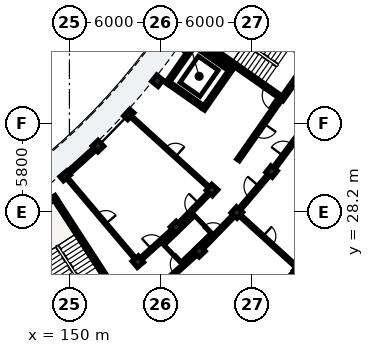
"""IFC4 building model, lengths in metres.
Left out: names, types, materials, properties, quantities, classifications, styles, units other than length and angle.
Written with IfcOpenShell. Run it as: python <this file> out.ifc"""

import sys

from ifc_helpers import new_model, si_unit, direction, frame, frame_2d, origin, origin_2d, place, context, subcontext, project, spatial, rectangle, extrude, element, fill, save


model = new_model("IFC4")
c1 = context("Model", 3, precision=1e-05, world=origin(), true_north=direction((0.0, 1.0)))
c2 = subcontext(c1, "Body", "Model", "MODEL_VIEW")
j1 = project(units=[si_unit("LENGTHUNIT", "METRE"), si_unit("PLANEANGLEUNIT", "RADIAN")], contexts=[c1])
p1 = place(None, origin())
s1 = spatial("IfcSite", under=j1, at=p1, CompositionType="ELEMENT")
p2 = place(p1, origin())
s2 = spatial("IfcBuilding", under=s1, at=p2, CompositionType="ELEMENT")
p3 = place(p2, frame((0.0, 0.0, 15.56)))
s3 = spatial("IfcBuildingStorey", under=s2, at=p3, CompositionType="ELEMENT", Elevation=15.56)
p4 = place(p3, frame((152.674, 23.484, 0.0), z_axis=(0.0, 0.0, 1.0), x_axis=(-0.544655453679, 0.838659905312, 0.0)))
e1 = element("IfcWall", 1, at=p4, inside=s3, PredefinedType="SHEAR", context=c2, shape_type="SweptSolid", body=[
    extrude(rectangle(XDim=6.6, YDim=0.25, at=frame_2d((3.3, 0.0))), origin(), (0.0, 0.0, 1.0), 3.11),
])
p5 = place(p3, frame((149.116, 29.192, 0.0), z_axis=(0.0, 0.0, 1.0), x_axis=(-0.838699580527, -0.544594356953, 0.0)))
e2 = element("IfcWall", 2, at=p5, inside=s3, PredefinedType="SHEAR", context=c2, shape_type="SweptSolid", body=[
    extrude(rectangle(XDim=3.42, YDim=0.25, at=frame_2d((1.71, 0.0))), origin(), (0.0, 0.0, 1.0), 3.11),
])
p6 = place(p3, frame((150.015, 21.757, 0.0), z_axis=(0.0, 0.0, 1.0), x_axis=(-0.544629435258, 0.838676802022, 0.0)))
e3 = element("IfcWall", 3, at=p6, inside=s3, PredefinedType="SHEAR", context=c2, shape_type="SweptSolid", body=[
    extrude(rectangle(XDim=6.6, YDim=0.25, at=frame_2d((3.3, 0.0))), origin(), (0.0, 0.0, 1.0), 3.11),
])
p7 = place(p6, frame((0.22, 0.0, 0.0)))
e4 = element("IfcOpeningElement", 4, at=p7, cuts=e3, PredefinedType="OPENING", context=c2, shape_type="SweptSolid", body=[
    extrude(rectangle(XDim=1.05, YDim=2.15, at=frame_2d((0.525, 1.075))), frame((0.0, 0.135, 0.0), z_axis=(0.0, -1.0, 0.0), x_axis=(1.0, 0.0, 0.0)), (0.0, 0.0, 1.0), 0.27),
])
p8 = place(p3, frame((165.733, 38.336, 0.0), z_axis=(0.0, 0.0, 1.0), x_axis=(-0.819153711596, 0.573574055182, 0.0)))
e5 = element("IfcWall", 5, at=p8, inside=s3, PredefinedType="SHEAR", context=c2, shape_type="SweptSolid", body=[
    extrude(rectangle(XDim=6.6, YDim=0.25, at=frame_2d((3.3, 0.0))), origin(), (0.0, 0.0, 1.0), 3.11),
])
p9 = place(p3, frame((165.907, 38.366, 0.0), z_axis=(0.0, 0.0, 1.0), x_axis=(-0.573582112484, -0.819148069789, 0.0)))
e6 = element("IfcWall", 6, at=p9, inside=s3, PredefinedType="SHEAR", context=c2, shape_type="SweptSolid", body=[
    extrude(rectangle(XDim=3.42, YDim=0.25, at=frame_2d((1.71, 0.0))), origin(), (0.0, 0.0, 1.0), 3.11),
])
p10 = place(p3, frame((163.914, 35.739, 0.0), z_axis=(0.0, 0.0, 1.0), x_axis=(-0.819153711596, 0.573574055182, 0.0)))
e7 = element("IfcWall", 7, at=p10, inside=s3, PredefinedType="SHEAR", context=c2, shape_type="SweptSolid", body=[
    extrude(rectangle(XDim=6.6, YDim=0.25, at=frame_2d((3.3, 0.0))), origin(), (0.0, 0.0, 1.0), 3.11),
])
p11 = place(p10, frame((0.22, 0.0, 0.0)))
e8 = element("IfcOpeningElement", 8, at=p11, cuts=e7, PredefinedType="OPENING", context=c2, shape_type="SweptSolid", body=[
    extrude(rectangle(XDim=1.05, YDim=2.15, at=frame_2d((0.525, 1.075))), frame((0.0, 0.135, 0.0), z_axis=(0.0, -1.0, 0.0), x_axis=(1.0, 0.0, 0.0)), (0.0, 0.0, 1.0), 0.27),
])
p12 = place(p3, frame((160.668, 37.615, 0.0), z_axis=(0.0, 0.0, 1.0), x_axis=(-0.573582966431, -0.819147471839, 0.0)))
e9 = element("IfcWall", 9, at=p12, inside=s3, PredefinedType="SHEAR", context=c2, shape_type="SweptSolid", body=[
    extrude(rectangle(XDim=3.26, YDim=0.23, at=frame_2d((1.63, 0.0))), origin(), (0.0, 0.0, 1.0), 3.11),
])
p13 = place(p12, frame((0.9, 0.0, 0.0)))
e10 = element("IfcOpeningElement", 10, at=p13, cuts=e9, PredefinedType="OPENING", context=c2, shape_type="SweptSolid", body=[
    extrude(rectangle(XDim=1.0, YDim=2.15, at=frame_2d((0.5, 1.075))), frame((0.0, 0.125, 0.0), z_axis=(0.0, -1.0, 0.0), x_axis=(1.0, 0.0, 0.0)), (0.0, 0.0, 1.0), 0.25),
])
p14 = place(p3, frame((158.268, 39.296, 0.0), z_axis=(0.0, 0.0, 1.0), x_axis=(-0.573582966431, -0.819147471839, 0.0)))
e11 = element("IfcWall", 11, at=p14, inside=s3, PredefinedType="SHEAR", context=c2, shape_type="SweptSolid", body=[
    extrude(rectangle(XDim=3.26, YDim=0.23, at=frame_2d((1.63, 0.0))), origin(), (0.0, 0.0, 1.0), 3.11),
])
p15 = place(p3, frame((160.508, 37.587, 0.0), z_axis=(0.0, 0.0, 1.0), x_axis=(-0.819189439894, 0.573523026186, 0.0)))
e12 = element("IfcWall", 12, at=p15, inside=s3, PredefinedType="SHEAR", context=c2, shape_type="SweptSolid", body=[
    extrude(rectangle(XDim=2.7, YDim=0.23, at=frame_2d((1.35, 0.0))), origin(), (0.0, 0.0, 1.0), 3.11),
])
p16 = place(p3, frame((158.77, 35.105, 0.0), z_axis=(0.0, 0.0, 1.0), x_axis=(-0.819117209968, 0.573626181702, 0.0)))
e13 = element("IfcWall", 13, at=p16, inside=s3, PredefinedType="SHEAR", context=c2, shape_type="SweptSolid", body=[
    extrude(rectangle(XDim=2.7, YDim=0.23, at=frame_2d((1.35, 0.0))), origin(), (0.0, 0.0, 1.0), 3.11),
])
p17 = place(p3, frame((149.72, 30.574, 0.0), z_axis=(0.0, 0.0, 1.0), x_axis=(0.646123979643, -0.763232469783, 0.0)))
e14 = element("IfcColumn", 14, at=p17, inside=s3, PredefinedType="PILASTER", context=c2, shape_type="SweptSolid", body=[
    extrude(rectangle(XDim=0.38, YDim=0.62, at=origin_2d()), origin(), (0.0, 0.0, 1.0), 3.11),
])
for number, where, z_axis, x_axis in (
    (15, (154.501, 24.927, 0.0), (0.0, 0.0, 1.0), (0.646, -0.763, 0.0)),
    (16, (151.878, 32.525, 0.0), (0.0, 0.0, 1.0), (0.695, -0.719, 0.0)),
    (17, (157.018, 27.202, 0.0), (0.0, 0.0, 1.0), (0.695, -0.719, 0.0)),
    (18, (158.546, 25.62, 0.0), (0.0, 0.0, 1.0), (0.695, -0.719, 0.0)),
):
    element("IfcColumn", number, at=place(p3, frame(where, z_axis=z_axis, x_axis=x_axis)), inside=s3, PredefinedType="COLUMN", context=c2, shape_type="SweptSolid", body=[
        extrude(rectangle(XDim=0.56, YDim=0.56, at=origin_2d()), origin(), (0.0, 0.0, 1.0), 3.11),
    ])
p18 = place(p3, frame((153.903, 34.613, 0.0), z_axis=(0.0, 0.0, 1.0), x_axis=(0.740218127487, -0.672366807435, 0.0)))
e19 = element("IfcColumn", 19, at=p18, inside=s3, PredefinedType="PILASTER", context=c2, shape_type="SweptSolid", body=[
    extrude(rectangle(XDim=0.38, YDim=0.62, at=origin_2d()), origin(), (0.0, 0.0, 1.0), 3.11),
])
for number, where, z_axis, x_axis in (
    (20, (159.38, 29.638, 0.0), (0.0, 0.0, 1.0), (0.74, -0.672, 0.0)),
    (21, (161.009, 28.159, 0.0), (0.0, 0.0, 1.0), (0.74, -0.672, 0.0)),
):
    element("IfcColumn", number, at=place(p3, frame(where, z_axis=z_axis, x_axis=x_axis)), inside=s3, PredefinedType="COLUMN", context=c2, shape_type="SweptSolid", body=[
        extrude(rectangle(XDim=0.56, YDim=0.56, at=origin_2d()), origin(), (0.0, 0.0, 1.0), 3.11),
    ])
p19 = place(p3, frame((165.08, 24.46, 0.0), z_axis=(0.0, 0.0, 1.0), x_axis=(0.740218127487, -0.672366807435, 0.0)))
e22 = element("IfcColumn", 22, at=p19, inside=s3, PredefinedType="PILASTER", context=c2, shape_type="SweptSolid", body=[
    extrude(rectangle(XDim=0.38, YDim=0.62, at=origin_2d()), origin(), (0.0, 0.0, 1.0), 3.11),
])
for number, where, z_axis, x_axis in (
    (23, (155.787, 36.829, 0.0), (0.0, 0.0, 1.0), (0.783, -0.623, 0.0)),
    (24, (163.3, 30.853, 0.0), (0.0, 0.0, 1.0), (0.783, -0.623, 0.0)),
):
    element("IfcColumn", number, at=place(p3, frame(where, z_axis=z_axis, x_axis=x_axis)), inside=s3, PredefinedType="COLUMN", context=c2, shape_type="SweptSolid", body=[
        extrude(rectangle(XDim=0.56, YDim=0.56, at=origin_2d()), origin(), (0.0, 0.0, 1.0), 3.11),
    ])
p20 = place(p3, frame((149.839, 30.682, 0.0), z_axis=(0.0, 0.0, 1.0), x_axis=(0.741683903342, 0.670749571393, 0.0)))
e25 = element("IfcWall", 25, at=p20, inside=s3, PredefinedType="SOLIDWALL", context=c2, shape_type="SweptSolid", body=[
    extrude(rectangle(XDim=2.499, YDim=0.24, at=frame_2d((1.25, 0.0))), origin(), (0.0, 0.0, 1.0), 2.355),
])
p21 = place(p20, frame((0.399, 0.0, 0.35)))
e26 = element("IfcOpeningElement", 26, at=p21, cuts=e25, PredefinedType="OPENING", context=c2, shape_type="SweptSolid", body=[
    extrude(rectangle(XDim=1.7, YDim=1.8, at=frame_2d((0.85, 0.9))), frame((0.0, 0.13, 0.0), z_axis=(0.0, -1.0, 0.0), x_axis=(1.0, 0.0, 0.0)), (0.0, 0.0, 1.0), 0.26),
])
p22 = place(p3, frame((162.541, 21.843, 0.0), z_axis=(0.0, 0.0, 1.0), x_axis=(0.696205978342, 0.717842068788, 0.0)))
e27 = element("IfcWall", 27, at=p22, inside=s3, PredefinedType="SOLIDWALL", context=c2, shape_type="SweptSolid", body=[
    extrude(rectangle(XDim=3.487, YDim=0.24, at=frame_2d((1.743, 0.0))), origin(), (0.0, 0.0, 1.0), 2.355),
])
p23 = place(p22, frame((0.993, 0.0, 0.35)))
e28 = element("IfcOpeningElement", 28, at=p23, cuts=e27, PredefinedType="OPENING", context=c2, shape_type="SweptSolid", body=[
    extrude(rectangle(XDim=1.5, YDim=1.7, at=frame_2d((0.75, 0.85))), frame((0.0, 0.13, 0.0), z_axis=(0.0, -1.0, 0.0), x_axis=(1.0, 0.0, 0.0)), (0.0, 0.0, 1.0), 0.26),
])
p24 = place(p3, frame((163.895, 35.624, 0.0), z_axis=(0.0, 0.0, 1.0), x_axis=(-0.573572687386, -0.819154669329, 0.0)))
e29 = element("IfcWall", 29, at=p24, inside=s3, PredefinedType="PARTITIONING", context=c2, shape_type="SweptSolid", body=[
    extrude(rectangle(XDim=4.9, YDim=0.22, at=frame_2d((2.45, 0.0))), origin(), (0.0, 0.0, 1.0), 2.34),
])
p25 = place(p24, frame((1.95, 0.0, 0.0)))
e30 = element("IfcOpeningElement", 30, at=p25, cuts=e29, PredefinedType="OPENING", context=c2, shape_type="SweptSolid", body=[
    extrude(rectangle(XDim=0.98, YDim=2.14, at=frame_2d((0.49, 1.07))), frame((0.0, 0.12, 0.0), z_axis=(0.0, -1.0, 0.0), x_axis=(1.0, 0.0, 0.0)), (0.0, 0.0, 1.0), 0.24),
])
p26 = place(p3, frame((149.979, 30.269, 0.0), z_axis=(0.0, 0.0, 1.0), x_axis=(0.646121311019, -0.763234728932, 0.0)))
e31 = element("IfcWall", 31, at=p26, inside=s3, PredefinedType="PARTITIONING", context=c2, shape_type="SweptSolid", body=[
    extrude(rectangle(XDim=6.6, YDim=0.125, at=frame_2d((3.3, 0.0))), origin(), (0.0, 0.0, 1.0), 2.37),
])
p27 = place(p26, frame((2.865, 0.0, 0.0)))
e32 = element("IfcOpeningElement", 32, at=p27, cuts=e31, PredefinedType="OPENING", context=c2, shape_type="SweptSolid", body=[
    extrude(rectangle(XDim=0.87, YDim=2.08, at=frame_2d((0.435, 1.04))), frame((0.0, 0.073, 0.0), z_axis=(0.0, -1.0, 0.0), x_axis=(1.0, 0.0, 0.0)), (0.0, 0.0, 1.0), 0.145),
])
p28 = place(p3, frame((156.183, 23.482, 0.0), z_axis=(0.0, 0.0, 1.0), x_axis=(0.741631592147, 0.670807410163, 0.0)))
e33 = element("IfcWall", 33, at=p28, inside=s3, PredefinedType="PARTITIONING", context=c2, shape_type="SweptSolid", body=[
    extrude(rectangle(XDim=2.837, YDim=0.195, at=frame_2d((1.418, 0.0))), origin(), (0.0, 0.0, 1.0), 2.37),
])
p29 = place(p28, frame((0.944, 0.0, 0.0)))
e34 = element("IfcOpeningElement", 34, at=p29, cuts=e33, PredefinedType="OPENING", context=c2, shape_type="SweptSolid", body=[
    extrude(rectangle(XDim=0.95, YDim=2.13, at=frame_2d((0.475, 1.065))), frame((0.0, 0.107, 0.0), z_axis=(0.0, -1.0, 0.0), x_axis=(1.0, 0.0, 0.0)), (0.0, 0.0, 1.0), 0.215),
])
p30 = place(p3, frame((154.761, 25.161, 0.0), z_axis=(0.0, 0.0, 1.0), x_axis=(0.74166462946, 0.670770882945, 0.0)))
e35 = element("IfcWall", 35, at=p30, inside=s3, PredefinedType="PARTITIONING", context=c2, shape_type="SweptSolid", body=[
    extrude(rectangle(XDim=2.693, YDim=0.195, at=frame_2d((1.347, 0.0))), origin(), (0.0, 0.0, 1.0), 2.37),
])
p31 = place(p30, frame((0.872, 0.0, 0.0)))
e36 = element("IfcOpeningElement", 36, at=p31, cuts=e35, PredefinedType="OPENING", context=c2, shape_type="SweptSolid", body=[
    extrude(rectangle(XDim=0.95, YDim=2.13, at=frame_2d((0.475, 1.065))), frame((0.0, 0.107, 0.0), z_axis=(0.0, -1.0, 0.0), x_axis=(1.0, 0.0, 0.0)), (0.0, 0.0, 1.0), 0.215),
])
p32 = place(p3, frame((158.79, 25.871, 0.0), z_axis=(0.0, 0.0, 1.0), x_axis=(0.696223786753, 0.717824796701, 0.0)))
e37 = element("IfcWall", 37, at=p32, inside=s3, PredefinedType="PARTITIONING", context=c2, shape_type="SweptSolid", body=[
    extrude(rectangle(XDim=2.837, YDim=0.195, at=frame_2d((1.418, 0.0))), origin(), (0.0, 0.0, 1.0), 2.37),
])
p33 = place(p32, frame((0.954, 0.0, 0.0)))
e38 = element("IfcOpeningElement", 38, at=p33, cuts=e37, PredefinedType="OPENING", context=c2, shape_type="SweptSolid", body=[
    extrude(rectangle(XDim=0.93, YDim=2.12, at=frame_2d((0.465, 1.06))), frame((0.0, 0.107, 0.0), z_axis=(0.0, -1.0, 0.0), x_axis=(1.0, 0.0, 0.0)), (0.0, 0.0, 1.0), 0.215),
])
p34 = place(p3, frame((157.262, 27.453, 0.0), z_axis=(0.0, 0.0, 1.0), x_axis=(0.696236443412, 0.717812520694, 0.0)))
e39 = element("IfcWall", 39, at=p34, inside=s3, PredefinedType="PARTITIONING", context=c2, shape_type="SweptSolid", body=[
    extrude(rectangle(XDim=2.693, YDim=0.195, at=frame_2d((1.347, 0.0))), origin(), (0.0, 0.0, 1.0), 2.37),
])
p35 = place(p34, frame((0.882, 0.0, 0.0)))
e40 = element("IfcOpeningElement", 40, at=p35, cuts=e39, PredefinedType="OPENING", context=c2, shape_type="SweptSolid", body=[
    extrude(rectangle(XDim=0.93, YDim=2.12, at=frame_2d((0.465, 1.06))), frame((0.0, 0.107, 0.0), z_axis=(0.0, -1.0, 0.0), x_axis=(1.0, 0.0, 0.0)), (0.0, 0.0, 1.0), 0.215),
])
p36 = place(p3, frame((161.305, 27.89, 0.0), z_axis=(0.0, 0.0, 1.0), x_axis=(0.740212663782, -0.672372822456, 0.0)))
e41 = element("IfcWall", 41, at=p36, inside=s3, PredefinedType="PLUMBINGWALL", context=c2, shape_type="SweptSolid", body=[
    extrude(rectangle(XDim=4.7, YDim=0.15, at=frame_2d((2.35, 0.0))), origin(), (0.0, 0.0, 1.0), 2.37),
])
p37 = place(p36, frame((1.925, 0.0, 0.0)))
e42 = element("IfcOpeningElement", 42, at=p37, cuts=e41, PredefinedType="OPENING", context=c2, shape_type="SweptSolid", body=[
    extrude(rectangle(XDim=0.85, YDim=2.05, at=frame_2d((0.425, 1.025))), frame((0.0, 0.085, 0.0), z_axis=(0.0, -1.0, 0.0), x_axis=(1.0, 0.0, 0.0)), (0.0, 0.0, 1.0), 0.17),
])
p38 = place(p3, frame((154.199, 34.344, 0.0), z_axis=(0.0, 0.0, 1.0), x_axis=(0.74023124711, -0.672352363573, 0.0)))
e43 = element("IfcWall", 43, at=p38, inside=s3, PredefinedType="PARTITIONING", context=c2, shape_type="SweptSolid", body=[
    extrude(rectangle(XDim=6.6, YDim=0.125, at=frame_2d((3.3, 0.0))), origin(), (0.0, 0.0, 1.0), 2.37),
])
p39 = place(p38, frame((2.855, 0.0, 0.0)))
e44 = element("IfcOpeningElement", 44, at=p39, cuts=e43, PredefinedType="OPENING", context=c2, shape_type="SweptSolid", body=[
    extrude(rectangle(XDim=0.89, YDim=2.1, at=frame_2d((0.445, 1.05))), frame((0.0, 0.073, 0.0), z_axis=(0.0, -1.0, 0.0), x_axis=(1.0, 0.0, 0.0)), (0.0, 0.0, 1.0), 0.145),
])
p40 = place(p3, frame((161.236, 28.425, 0.0), z_axis=(0.0, 0.0, 1.0), x_axis=(0.64778830669, 0.761820392032, 0.0)))
e45 = element("IfcWall", 45, at=p40, inside=s3, PredefinedType="PARTITIONING", context=c2, shape_type="SweptSolid", body=[
    extrude(rectangle(XDim=2.837, YDim=0.195, at=frame_2d((1.418, 0.0))), origin(), (0.0, 0.0, 1.0), 2.37),
])
p41 = place(p40, frame((0.924, 0.0, 0.0)))
e46 = element("IfcOpeningElement", 46, at=p41, cuts=e45, PredefinedType="OPENING", context=c2, shape_type="SweptSolid", body=[
    extrude(rectangle(XDim=0.99, YDim=2.16, at=frame_2d((0.495, 1.08))), frame((0.0, 0.107, 0.0), z_axis=(0.0, -1.0, 0.0), x_axis=(1.0, 0.0, 0.0)), (0.0, 0.0, 1.0), 0.215),
])
p42 = place(p3, frame((163.509, 31.134, 0.0), z_axis=(0.0, 0.0, 1.0), x_axis=(0.596552136601, 0.802574325727, 0.0)))
e47 = element("IfcWall", 47, at=p42, inside=s3, PredefinedType="PARTITIONING", context=c2, shape_type="SweptSolid", body=[
    extrude(rectangle(XDim=2.837, YDim=0.195, at=frame_2d((1.418, 0.0))), origin(), (0.0, 0.0, 1.0), 2.37),
])
p43 = place(p42, frame((0.934, 0.0, 0.0)))
e48 = element("IfcOpeningElement", 48, at=p43, cuts=e47, PredefinedType="OPENING", context=c2, shape_type="SweptSolid", body=[
    extrude(rectangle(XDim=0.97, YDim=2.15, at=frame_2d((0.485, 1.075))), frame((0.0, 0.107, 0.0), z_axis=(0.0, -1.0, 0.0), x_axis=(1.0, 0.0, 0.0)), (0.0, 0.0, 1.0), 0.215),
])
p44 = place(p21, origin())
e49 = element("IfcWindow", 49, at=p44, inside=s3, PartitioningType="SINGLE_PANEL", PredefinedType="WINDOW", context=c2, shape_type="SweptSolid", body=[
    extrude(rectangle(XDim=1.7, YDim=1.8, at=frame_2d((0.85, 0.9))), frame((0.0, 0.03, 0.0), z_axis=(0.0, -1.0, 0.0), x_axis=(1.0, 0.0, 0.0)), (0.0, 0.0, 1.0), 0.06),
])
fill(e26, e49)
p45 = place(p11, origin())
e50 = element("IfcDoor", 50, at=p45, inside=s3, OperationType="SINGLE_SWING_LEFT", PredefinedType="DOOR", context=c2, shape_type="SweptSolid", body=[
    extrude(rectangle(XDim=1.05, YDim=2.15, at=frame_2d((0.525, 1.075))), frame((0.0, 0.025, 0.0), z_axis=(0.0, -1.0, 0.0), x_axis=(1.0, 0.0, 0.0)), (0.0, 0.0, 1.0), 0.05),
])
fill(e8, e50)
p46 = place(p13, origin())
e51 = element("IfcDoor", 51, at=p46, inside=s3, OperationType="DOUBLE_DOOR_SLIDING", PredefinedType="DOOR", context=c2, shape_type="SweptSolid", body=[
    extrude(rectangle(XDim=1.0, YDim=2.15, at=frame_2d((0.5, 1.075))), frame((0.0, 0.025, 0.0), z_axis=(0.0, -1.0, 0.0), x_axis=(1.0, 0.0, 0.0)), (0.0, 0.0, 1.0), 0.05),
])
fill(e10, e51)
p47 = place(p25, origin())
e52 = element("IfcDoor", 52, at=p47, inside=s3, OperationType="SINGLE_SWING_LEFT", PredefinedType="DOOR", context=c2, shape_type="SweptSolid", body=[
    extrude(rectangle(XDim=0.98, YDim=2.14, at=frame_2d((0.49, 1.07))), frame((0.0, 0.025, 0.0), z_axis=(0.0, -1.0, 0.0), x_axis=(1.0, 0.0, 0.0)), (0.0, 0.0, 1.0), 0.05),
])
fill(e30, e52)
p48 = place(p27, origin())
e53 = element("IfcDoor", 53, at=p48, inside=s3, OperationType="SINGLE_SWING_RIGHT", PredefinedType="DOOR", context=c2, shape_type="SweptSolid", body=[
    extrude(rectangle(XDim=0.87, YDim=2.08, at=frame_2d((0.435, 1.04))), frame((0.0, 0.025, 0.0), z_axis=(0.0, -1.0, 0.0), x_axis=(1.0, 0.0, 0.0)), (0.0, 0.0, 1.0), 0.05),
])
fill(e32, e53)
p49 = place(p29, origin())
e54 = element("IfcDoor", 54, at=p49, inside=s3, OperationType="SINGLE_SWING_RIGHT", PredefinedType="DOOR", context=c2, shape_type="SweptSolid", body=[
    extrude(rectangle(XDim=0.95, YDim=2.13, at=frame_2d((0.475, 1.065))), frame((0.0, 0.025, 0.0), z_axis=(0.0, -1.0, 0.0), x_axis=(1.0, 0.0, 0.0)), (0.0, 0.0, 1.0), 0.05),
])
fill(e34, e54)
p50 = place(p31, origin())
e55 = element("IfcDoor", 55, at=p50, inside=s3, OperationType="SINGLE_SWING_LEFT", PredefinedType="DOOR", context=c2, shape_type="SweptSolid", body=[
    extrude(rectangle(XDim=0.95, YDim=2.13, at=frame_2d((0.475, 1.065))), frame((0.0, 0.025, 0.0), z_axis=(0.0, -1.0, 0.0), x_axis=(1.0, 0.0, 0.0)), (0.0, 0.0, 1.0), 0.05),
])
fill(e36, e55)
p51 = place(p33, origin())
e56 = element("IfcDoor", 56, at=p51, inside=s3, OperationType="SINGLE_SWING_LEFT", PredefinedType="DOOR", context=c2, shape_type="SweptSolid", body=[
    extrude(rectangle(XDim=0.93, YDim=2.12, at=frame_2d((0.465, 1.06))), frame((0.0, 0.025, 0.0), z_axis=(0.0, -1.0, 0.0), x_axis=(1.0, 0.0, 0.0)), (0.0, 0.0, 1.0), 0.05),
])
fill(e38, e56)
p52 = place(p35, origin())
e57 = element("IfcDoor", 57, at=p52, inside=s3, OperationType="SINGLE_SWING_RIGHT", PredefinedType="DOOR", context=c2, shape_type="SweptSolid", body=[
    extrude(rectangle(XDim=0.93, YDim=2.12, at=frame_2d((0.465, 1.06))), frame((0.0, 0.025, 0.0), z_axis=(0.0, -1.0, 0.0), x_axis=(1.0, 0.0, 0.0)), (0.0, 0.0, 1.0), 0.05),
])
fill(e40, e57)
p53 = place(p37, origin())
e58 = element("IfcDoor", 58, at=p53, inside=s3, OperationType="SINGLE_SWING_LEFT", PredefinedType="DOOR", context=c2, shape_type="SweptSolid", body=[
    extrude(rectangle(XDim=0.85, YDim=2.05, at=frame_2d((0.425, 1.025))), frame((0.0, 0.025, 0.0), z_axis=(0.0, -1.0, 0.0), x_axis=(1.0, 0.0, 0.0)), (0.0, 0.0, 1.0), 0.05),
])
fill(e42, e58)
p54 = place(p39, origin())
e59 = element("IfcDoor", 59, at=p54, inside=s3, OperationType="SINGLE_SWING_RIGHT", PredefinedType="DOOR", context=c2, shape_type="SweptSolid", body=[
    extrude(rectangle(XDim=0.89, YDim=2.1, at=frame_2d((0.445, 1.05))), frame((0.0, 0.025, 0.0), z_axis=(0.0, -1.0, 0.0), x_axis=(1.0, 0.0, 0.0)), (0.0, 0.0, 1.0), 0.05),
])
fill(e44, e59)
p55 = place(p41, origin())
e60 = element("IfcDoor", 60, at=p55, inside=s3, OperationType="SINGLE_SWING_RIGHT", PredefinedType="DOOR", context=c2, shape_type="SweptSolid", body=[
    extrude(rectangle(XDim=0.99, YDim=2.16, at=frame_2d((0.495, 1.08))), frame((0.0, 0.025, 0.0), z_axis=(0.0, -1.0, 0.0), x_axis=(1.0, 0.0, 0.0)), (0.0, 0.0, 1.0), 0.05),
])
fill(e46, e60)
p56 = place(p43, origin())
e61 = element("IfcDoor", 61, at=p56, inside=s3, OperationType="SINGLE_SWING_LEFT", PredefinedType="DOOR", context=c2, shape_type="SweptSolid", body=[
    extrude(rectangle(XDim=0.97, YDim=2.15, at=frame_2d((0.485, 1.075))), frame((0.0, 0.025, 0.0), z_axis=(0.0, -1.0, 0.0), x_axis=(1.0, 0.0, 0.0)), (0.0, 0.0, 1.0), 0.05),
])
fill(e48, e61)
save(model, sys.argv[1])
